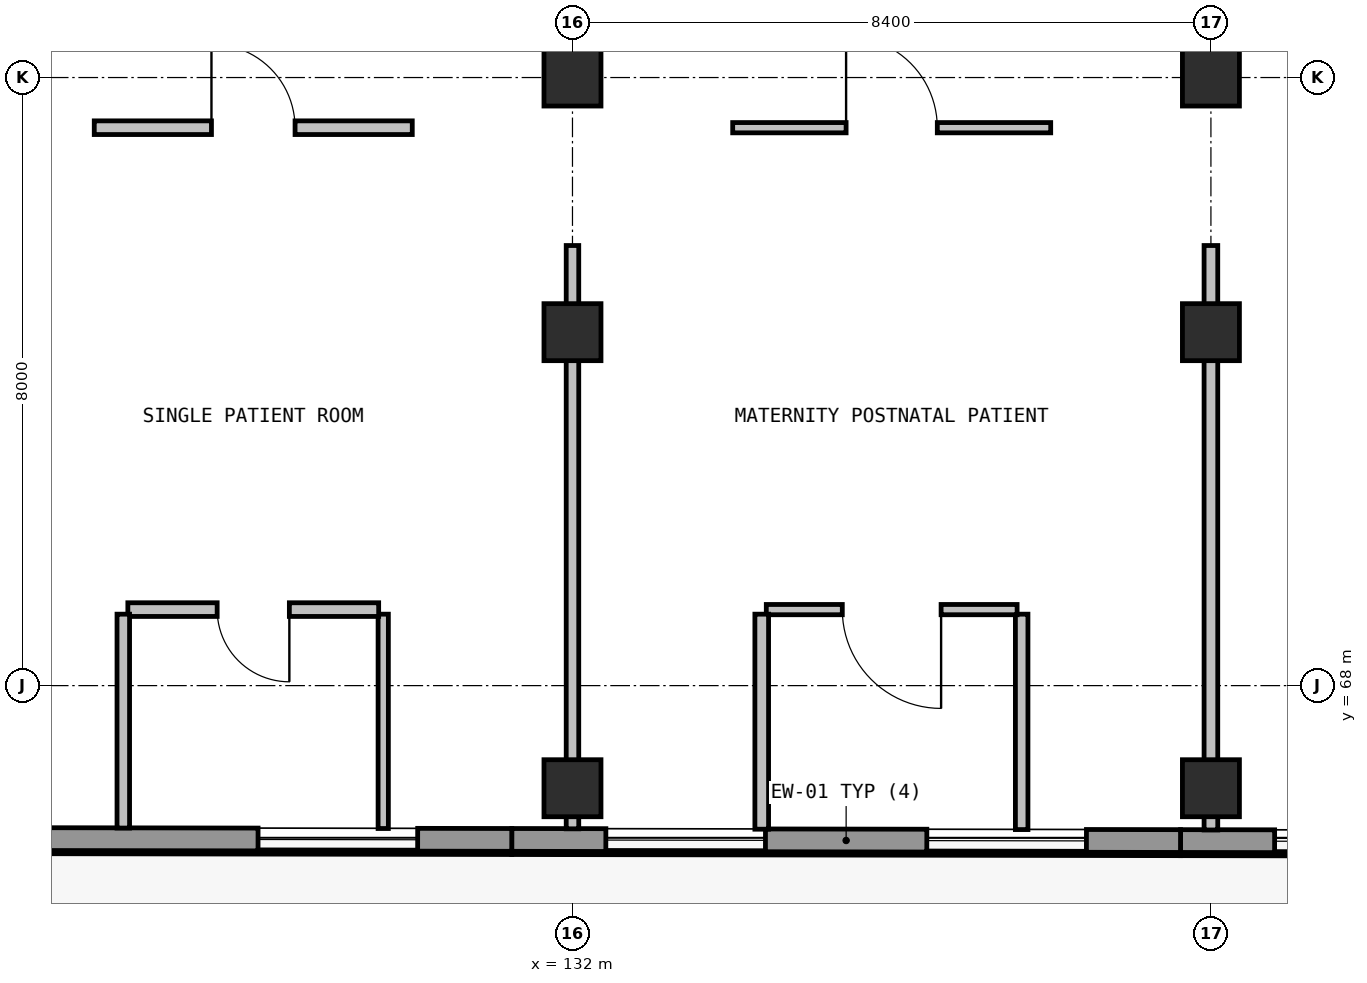
"""IFC4 building model, lengths in metres.
Left out: names, types, materials, properties, quantities, classifications, styles, units other than length and angle.
Written with IfcOpenShell. Run it as: python <this file> out.ifc"""

import sys

from ifc_helpers import new_model, si_unit, direction, frame, frame_2d, origin, origin_2d, place, context, subcontext, project, spatial, rectangle, extrude, element, fill, save


model = new_model("IFC4")
c1 = context("Model", 3, precision=1e-05, world=origin(), true_north=direction((0.0, 1.0)))
c2 = subcontext(c1, "Body", "Model", "MODEL_VIEW")
j1 = project(units=[si_unit("LENGTHUNIT", "METRE"), si_unit("PLANEANGLEUNIT", "RADIAN")], contexts=[c1])
p1 = place(None, origin())
s1 = spatial("IfcSite", under=j1, at=p1, CompositionType="ELEMENT")
p2 = place(p1, origin())
s2 = spatial("IfcBuilding", under=s1, at=p2, CompositionType="ELEMENT")
p3 = place(p2, frame((0.0, 0.0, 19.2)))
s3 = spatial("IfcBuildingStorey", under=s2, at=p3, CompositionType="ELEMENT", Elevation=19.2)
for number, where, z_axis, x_axis in (
    (1, (132.0, 66.65, 0.0), (0.0, 0.0, 1.0), (1.0, 0.0, 0.0)),
    (2, (132.0, 72.65, 0.0), (0.0, 0.0, 1.0), (1.0, 0.0, 0.0)),
    (3, (132.0, 76.0, 0.0), (0.0, 0.0, 1.0), (1.0, 0.0, 0.0)),
    (4, (140.4, 66.65, 0.0), (0.0, 0.0, 1.0), (1.0, 0.0, 0.0)),
    (5, (140.4, 72.65, 0.0), (0.0, 0.0, 1.0), (1.0, 0.0, 0.0)),
    (6, (140.4, 76.0, 0.0), (0.0, 0.0, 1.0), (1.0, 0.0, 0.0)),
):
    element("IfcColumn", number, at=place(p3, frame(where, z_axis=z_axis, x_axis=x_axis)), inside=s3, PredefinedType="COLUMN", context=c2, shape_type="SweptSolid", body=[
        extrude(rectangle(XDim=0.75, YDim=0.75, at=origin_2d()), origin(), (0.0, 0.0, 1.0), 3.75),
    ])
p4 = place(p3, frame((148.8, 65.94, 0.0), z_axis=(0.0, 0.0, 1.0), x_axis=(-0.999998520679, 0.001720069588, 0.0)))
e7 = element("IfcWall", 7, at=p4, inside=s3, PredefinedType="SOLIDWALL", context=c2, shape_type="SweptSolid", body=[
    extrude(rectangle(XDim=8.8, YDim=0.3, at=frame_2d((4.4, 0.0))), origin(), (0.0, 0.0, 1.0), 3.77),
])
p5 = place(p4, frame((1.238, 0.0, 0.96)))
e8 = element("IfcOpeningElement", 8, at=p5, cuts=e7, PredefinedType="OPENING", context=c2, shape_type="SweptSolid", body=[
    extrude(rectangle(XDim=2.1, YDim=1.8, at=frame_2d((1.05, 0.9))), frame((0.0, 0.16, 0.0), z_axis=(0.0, -1.0, 0.0), x_axis=(1.0, 0.0, 0.0)), (0.0, 0.0, 1.0), 0.32),
])
p6 = place(p4, frame((5.462, 0.0, 0.96)))
e9 = element("IfcOpeningElement", 9, at=p6, cuts=e7, PredefinedType="OPENING", context=c2, shape_type="SweptSolid", body=[
    extrude(rectangle(XDim=2.1, YDim=1.8, at=frame_2d((1.05, 0.9))), frame((0.0, 0.16, 0.0), z_axis=(0.0, -1.0, 0.0), x_axis=(1.0, 0.0, 0.0)), (0.0, 0.0, 1.0), 0.32),
])
p7 = place(p3, frame((140.0, 65.955, 0.0), z_axis=(0.0, 0.0, 1.0), x_axis=(-0.999998567696, 0.001692514432, 0.0)))
e10 = element("IfcWall", 10, at=p7, inside=s3, PredefinedType="SOLIDWALL", context=c2, shape_type="SweptSolid", body=[
    extrude(rectangle(XDim=8.799, YDim=0.3, at=frame_2d((4.399, 0.0))), origin(), (0.0, 0.0, 1.0), 3.77),
])
p8 = place(p7, frame((1.238, 0.0, 0.96)))
e11 = element("IfcOpeningElement", 11, at=p8, cuts=e10, PredefinedType="OPENING", context=c2, shape_type="SweptSolid", body=[
    extrude(rectangle(XDim=2.1, YDim=1.8, at=frame_2d((1.05, 0.9))), frame((0.0, 0.16, 0.0), z_axis=(0.0, -1.0, 0.0), x_axis=(1.0, 0.0, 0.0)), (0.0, 0.0, 1.0), 0.32),
])
p9 = place(p7, frame((5.461, 0.0, 0.96)))
e12 = element("IfcOpeningElement", 12, at=p9, cuts=e10, PredefinedType="OPENING", context=c2, shape_type="SweptSolid", body=[
    extrude(rectangle(XDim=2.1, YDim=1.8, at=frame_2d((1.05, 0.9))), frame((0.0, 0.16, 0.0), z_axis=(0.0, -1.0, 0.0), x_axis=(1.0, 0.0, 0.0)), (0.0, 0.0, 1.0), 0.32),
])
p10 = place(p3, frame((131.201, 65.97, 0.0), z_axis=(0.0, 0.0, 1.0), x_axis=(-0.999998520679, 0.001720069588, 0.0)))
e13 = element("IfcWall", 13, at=p10, inside=s3, PredefinedType="SOLIDWALL", context=c2, shape_type="SweptSolid", body=[
    extrude(rectangle(XDim=8.8, YDim=0.3, at=frame_2d((4.4, 0.0))), origin(), (0.0, 0.0, 1.0), 3.77),
])
p11 = place(p10, frame((1.238, 0.0, 0.96)))
e14 = element("IfcOpeningElement", 14, at=p11, cuts=e13, PredefinedType="OPENING", context=c2, shape_type="SweptSolid", body=[
    extrude(rectangle(XDim=2.1, YDim=1.8, at=frame_2d((1.05, 0.9))), frame((0.0, 0.16, 0.0), z_axis=(0.0, -1.0, 0.0), x_axis=(1.0, 0.0, 0.0)), (0.0, 0.0, 1.0), 0.32),
])
p12 = place(p3, frame((125.708, 75.34, 0.0), z_axis=(0.0, 0.0, 1.0), x_axis=(1.0, 0.0, 0.0)))
e15 = element("IfcWall", 15, at=p12, inside=s3, PredefinedType="PARTITIONING", context=c2, shape_type="SweptSolid", body=[
    extrude(rectangle(XDim=4.184, YDim=0.18, at=frame_2d((2.092, 0.0))), origin(), (0.0, 0.0, 1.0), 3.77),
])
p13 = place(p12, frame((1.542, 0.0, 0.0)))
e16 = element("IfcOpeningElement", 16, at=p13, cuts=e15, PredefinedType="OPENING", context=c2, shape_type="SweptSolid", body=[
    extrude(rectangle(XDim=1.1, YDim=2.15, at=frame_2d((0.55, 1.075))), frame((0.0, 0.1, 0.0), z_axis=(0.0, -1.0, 0.0), x_axis=(1.0, 0.0, 0.0)), (0.0, 0.0, 1.0), 0.2),
])
p14 = place(p3, frame((132.0, 73.79, 0.0), z_axis=(0.0, 0.0, 1.0), x_axis=(0.0, -1.0, 0.0)))
e17 = element("IfcWall", 17, at=p14, inside=s3, PredefinedType="PARTITIONING", context=c2, shape_type="SweptSolid", body=[
    extrude(rectangle(XDim=7.674, YDim=0.165, at=frame_2d((3.837, 0.0))), origin(), (0.0, 0.0, 1.0), 3.1),
])
p15 = place(p3, frame((129.51, 66.12, 0.0), z_axis=(0.0, 0.0, 1.0), x_axis=(0.0, 1.0, 0.0)))
e18 = element("IfcWall", 18, at=p15, inside=s3, PredefinedType="PARTITIONING", context=c2, shape_type="SweptSolid", body=[
    extrude(rectangle(XDim=2.82, YDim=0.135, at=frame_2d((1.41, 0.0))), origin(), (0.0, 0.0, 1.0), 3.77),
])
p16 = place(p3, frame((129.45, 69.0, 0.0), z_axis=(0.0, 0.0, 1.0), x_axis=(-1.0, 0.0, 0.0)))
e19 = element("IfcWall", 19, at=p16, inside=s3, PredefinedType="PARTITIONING", context=c2, shape_type="SweptSolid", body=[
    extrude(rectangle(XDim=3.3, YDim=0.18, at=frame_2d((1.65, 0.0))), origin(), (0.0, 0.0, 1.0), 3.77),
])
p17 = place(p16, frame((1.175, 0.0, 0.0)))
e20 = element("IfcOpeningElement", 20, at=p17, cuts=e19, PredefinedType="OPENING", context=c2, shape_type="SweptSolid", body=[
    extrude(rectangle(XDim=0.95, YDim=2.1, at=frame_2d((0.475, 1.05))), frame((0.0, 0.1, 0.0), z_axis=(0.0, -1.0, 0.0), x_axis=(1.0, 0.0, 0.0)), (0.0, 0.0, 1.0), 0.2),
])
p18 = place(p3, frame((126.09, 68.94, 0.0), z_axis=(0.0, 0.0, 1.0), x_axis=(0.0, -1.0, 0.0)))
e21 = element("IfcWall", 21, at=p18, inside=s3, PredefinedType="PARTITIONING", context=c2, shape_type="SweptSolid", body=[
    extrude(rectangle(XDim=2.814, YDim=0.165, at=frame_2d((1.407, 0.0))), origin(), (0.0, 0.0, 1.0), 3.77),
])
p19 = place(p3, frame((134.108, 75.34, 0.0), z_axis=(0.0, 0.0, 1.0), x_axis=(1.0, 0.0, 0.0)))
e22 = element("IfcWall", 22, at=p19, inside=s3, PredefinedType="PARTITIONING", context=c2, shape_type="SweptSolid", body=[
    extrude(rectangle(XDim=4.184, YDim=0.135, at=frame_2d((2.092, 0.0))), origin(), (0.0, 0.0, 1.0), 3.77),
])
p20 = place(p19, frame((1.492, 0.0, 0.0)))
e23 = element("IfcOpeningElement", 23, at=p20, cuts=e22, PredefinedType="OPENING", context=c2, shape_type="SweptSolid", body=[
    extrude(rectangle(XDim=1.2, YDim=2.15, at=frame_2d((0.6, 1.075))), frame((0.0, 0.077, 0.0), z_axis=(0.0, -1.0, 0.0), x_axis=(1.0, 0.0, 0.0)), (0.0, 0.0, 1.0), 0.155),
])
p21 = place(p3, frame((140.4, 73.79, 0.0), z_axis=(0.0, 0.0, 1.0), x_axis=(0.0, -1.0, 0.0)))
e24 = element("IfcWall", 24, at=p21, inside=s3, PredefinedType="PARTITIONING", context=c2, shape_type="SweptSolid", body=[
    extrude(rectangle(XDim=7.689, YDim=0.18, at=frame_2d((3.844, 0.0))), origin(), (0.0, 0.0, 1.0), 3.1),
])
p22 = place(p3, frame((137.91, 66.106, 0.0), z_axis=(0.0, 0.0, 1.0), x_axis=(0.0, 1.0, 0.0)))
e25 = element("IfcWall", 25, at=p22, inside=s3, PredefinedType="PARTITIONING", context=c2, shape_type="SweptSolid", body=[
    extrude(rectangle(XDim=2.834, YDim=0.165, at=frame_2d((1.417, 0.0))), origin(), (0.0, 0.0, 1.0), 3.77),
])
p23 = place(p3, frame((137.85, 69.0, 0.0), z_axis=(0.0, 0.0, 1.0), x_axis=(-1.0, 0.0, 0.0)))
e26 = element("IfcWall", 26, at=p23, inside=s3, PredefinedType="PARTITIONING", context=c2, shape_type="SweptSolid", body=[
    extrude(rectangle(XDim=3.3, YDim=0.135, at=frame_2d((1.65, 0.0))), origin(), (0.0, 0.0, 1.0), 3.77),
])
p24 = place(p23, frame((1.0, 0.0, 0.0)))
e27 = element("IfcOpeningElement", 27, at=p24, cuts=e26, PredefinedType="OPENING", context=c2, shape_type="SweptSolid", body=[
    extrude(rectangle(XDim=1.3, YDim=2.15, at=frame_2d((0.65, 1.075))), frame((0.0, 0.077, 0.0), z_axis=(0.0, -1.0, 0.0), x_axis=(1.0, 0.0, 0.0)), (0.0, 0.0, 1.0), 0.155),
])
p25 = place(p3, frame((134.49, 68.94, 0.0), z_axis=(0.0, 0.0, 1.0), x_axis=(0.0, -1.0, 0.0)))
e28 = element("IfcWall", 28, at=p25, inside=s3, PredefinedType="PARTITIONING", context=c2, shape_type="SweptSolid", body=[
    extrude(rectangle(XDim=2.829, YDim=0.18, at=frame_2d((1.415, 0.0))), origin(), (0.0, 0.0, 1.0), 3.77),
])
p26 = place(p6, origin())
e29 = element("IfcWindow", 29, at=p26, inside=s3, PartitioningType="SINGLE_PANEL", PredefinedType="WINDOW", context=c2, shape_type="SweptSolid", body=[
    extrude(rectangle(XDim=2.1, YDim=1.8, at=frame_2d((1.05, 0.9))), frame((0.0, 0.03, 0.0), z_axis=(0.0, -1.0, 0.0), x_axis=(1.0, 0.0, 0.0)), (0.0, 0.0, 1.0), 0.06),
])
fill(e9, e29)
p27 = place(p8, origin())
e30 = element("IfcWindow", 30, at=p27, inside=s3, PartitioningType="SINGLE_PANEL", PredefinedType="WINDOW", context=c2, shape_type="SweptSolid", body=[
    extrude(rectangle(XDim=2.1, YDim=1.8, at=frame_2d((1.05, 0.9))), frame((0.0, 0.03, 0.0), z_axis=(0.0, -1.0, 0.0), x_axis=(1.0, 0.0, 0.0)), (0.0, 0.0, 1.0), 0.06),
])
fill(e11, e30)
p28 = place(p9, origin())
e31 = element("IfcWindow", 31, at=p28, inside=s3, PartitioningType="SINGLE_PANEL", PredefinedType="WINDOW", context=c2, shape_type="SweptSolid", body=[
    extrude(rectangle(XDim=2.1, YDim=1.8, at=frame_2d((1.05, 0.9))), frame((0.0, 0.03, 0.0), z_axis=(0.0, -1.0, 0.0), x_axis=(1.0, 0.0, 0.0)), (0.0, 0.0, 1.0), 0.06),
])
fill(e12, e31)
p29 = place(p11, origin())
e32 = element("IfcWindow", 32, at=p29, inside=s3, PartitioningType="SINGLE_PANEL", PredefinedType="WINDOW", context=c2, shape_type="SweptSolid", body=[
    extrude(rectangle(XDim=2.1, YDim=1.8, at=frame_2d((1.05, 0.9))), frame((0.0, 0.03, 0.0), z_axis=(0.0, -1.0, 0.0), x_axis=(1.0, 0.0, 0.0)), (0.0, 0.0, 1.0), 0.06),
])
fill(e14, e32)
p30 = place(p13, origin())
e33 = element("IfcDoor", 33, at=p30, inside=s3, OperationType="SINGLE_SWING_RIGHT", PredefinedType="DOOR", context=c2, shape_type="SweptSolid", body=[
    extrude(rectangle(XDim=1.1, YDim=2.15, at=frame_2d((0.55, 1.075))), frame((0.0, 0.025, 0.0), z_axis=(0.0, -1.0, 0.0), x_axis=(1.0, 0.0, 0.0)), (0.0, 0.0, 1.0), 0.05),
])
fill(e16, e33)
p31 = place(p17, origin())
e34 = element("IfcDoor", 34, at=p31, inside=s3, OperationType="SINGLE_SWING_LEFT", PredefinedType="DOOR", context=c2, shape_type="SweptSolid", body=[
    extrude(rectangle(XDim=0.95, YDim=2.1, at=frame_2d((0.475, 1.05))), frame((0.0, 0.025, 0.0), z_axis=(0.0, -1.0, 0.0), x_axis=(1.0, 0.0, 0.0)), (0.0, 0.0, 1.0), 0.05),
])
fill(e20, e34)
p32 = place(p20, origin())
e35 = element("IfcDoor", 35, at=p32, inside=s3, OperationType="SINGLE_SWING_RIGHT", PredefinedType="DOOR", context=c2, shape_type="SweptSolid", body=[
    extrude(rectangle(XDim=1.2, YDim=2.15, at=frame_2d((0.6, 1.075))), frame((0.0, 0.025, 0.0), z_axis=(0.0, -1.0, 0.0), x_axis=(1.0, 0.0, 0.0)), (0.0, 0.0, 1.0), 0.05),
])
fill(e23, e35)
p33 = place(p24, origin())
e36 = element("IfcDoor", 36, at=p33, inside=s3, OperationType="SINGLE_SWING_LEFT", PredefinedType="DOOR", context=c2, shape_type="SweptSolid", body=[
    extrude(rectangle(XDim=1.3, YDim=2.15, at=frame_2d((0.65, 1.075))), frame((0.0, 0.025, 0.0), z_axis=(0.0, -1.0, 0.0), x_axis=(1.0, 0.0, 0.0)), (0.0, 0.0, 1.0), 0.05),
])
fill(e27, e36)
save(model, sys.argv[1])
